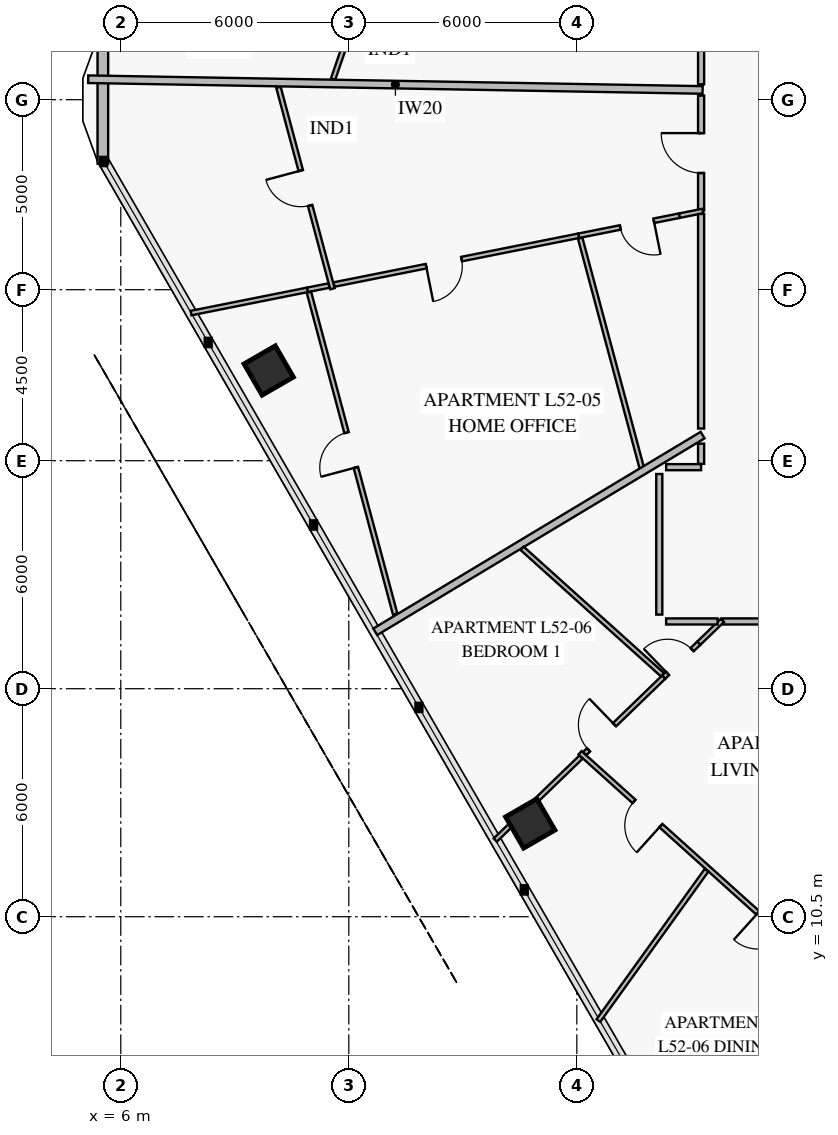
"""IFC4 building model, lengths in metres.
Left out: names, types, materials, properties, quantities, classifications, styles, units other than length and angle.
Written with IfcOpenShell. Run it as: python <this file> out.ifc"""

import sys

from ifc_helpers import new_model, si_unit, direction, frame, frame_2d, origin, origin_2d, place, context, subcontext, project, spatial, rectangle, extrude, element, fill, save


model = new_model("IFC4")
c1 = context("Model", 3, precision=1e-05, world=origin(), true_north=direction((0.0, 1.0)))
c2 = subcontext(c1, "Body", "Model", "MODEL_VIEW")
j1 = project(units=[si_unit("LENGTHUNIT", "METRE"), si_unit("PLANEANGLEUNIT", "RADIAN")], contexts=[c1])
p1 = place(None, origin())
s1 = spatial("IfcSite", under=j1, at=p1, CompositionType="ELEMENT")
p2 = place(p1, origin())
s2 = spatial("IfcBuilding", under=s1, at=p2, CompositionType="ELEMENT")
p3 = place(p2, frame((0.0, 0.0, 207.4)))
s3 = spatial("IfcBuildingStorey", under=s2, at=p3, CompositionType="ELEMENT", Elevation=207.4)
for number, where, z_axis, x_axis in (
    (1, (9.892, 24.874, 0.0), (0.0, 0.0, 1.0), (0.5, -0.866, 0.0)),
    (2, (16.774, 12.953, 0.0), (0.0, 0.0, 1.0), (0.5, -0.866, 0.0)),
):
    element("IfcColumn", number, at=place(p3, frame(where, z_axis=z_axis, x_axis=x_axis)), inside=s3, PredefinedType="COLUMN", context=c2, shape_type="SweptSolid", body=[
        extrude(rectangle(XDim=0.95, YDim=0.95, at=origin_2d()), origin(), (0.0, 0.0, 1.0), 3.55),
    ])
p4 = place(p3, frame((5.528, 30.317, 0.0), z_axis=(0.0, 0.0, 1.0), x_axis=(0.0, 1.0, 0.0)))
e3 = element("IfcWall", 3, at=p4, inside=s3, PredefinedType="SOLIDWALL", context=c2, shape_type="SweptSolid", body=[
    extrude(rectangle(XDim=3.365, YDim=0.28, at=frame_2d((1.683, 0.0))), origin(), (0.0, 0.0, 1.0), 3.55),
])
p5 = place(p3, frame((14.596, 41.283, 0.0), z_axis=(0.0, 0.0, 1.0), x_axis=(-0.325558599515, -0.945521865576, 0.0)))
e4 = element("IfcWall", 4, at=p5, inside=s3, PredefinedType="PARTITIONING", context=c2, shape_type="SweptSolid", body=[
    extrude(rectangle(XDim=9.247, YDim=0.12, at=frame_2d((4.624, 0.0))), origin(), (0.0, 0.0, 1.0), 2.9),
])
p6 = place(p5, frame((1.906, 0.0, 0.0)))
e5 = element("IfcOpeningElement", 5, at=p6, cuts=e4, PredefinedType="OPENING", context=c2, shape_type="SweptSolid", body=[
    extrude(rectangle(XDim=0.95, YDim=2.1, at=frame_2d((0.475, 1.05))), frame((0.0, 0.072, 0.0), z_axis=(0.0, -1.0, 0.0), x_axis=(1.0, 0.0, 0.0)), (0.0, 0.0, 1.0), 0.144),
])
p7 = place(p5, frame((6.289, 0.0, 0.0)))
e6 = element("IfcOpeningElement", 6, at=p7, cuts=e4, PredefinedType="OPENING", context=c2, shape_type="SweptSolid", body=[
    extrude(rectangle(XDim=0.95, YDim=2.1, at=frame_2d((0.475, 1.05))), frame((0.0, 0.072, 0.0), z_axis=(0.0, -1.0, 0.0), x_axis=(1.0, 0.0, 0.0)), (0.0, 0.0, 1.0), 0.144),
])
p8 = place(p3, frame((21.27, 38.292, 0.0), z_axis=(0.0, 0.0, 1.0), x_axis=(0.0, -1.0, 0.0)))
e7 = element("IfcWall", 7, at=p8, inside=s3, PredefinedType="PARTITIONING", context=c2, shape_type="SweptSolid", body=[
    extrude(rectangle(XDim=5.886, YDim=0.16, at=frame_2d((2.943, 0.0))), origin(), (0.0, 0.0, 1.0), 2.9),
])
p9 = place(p8, frame((2.418, 0.0, 0.0)))
e8 = element("IfcOpeningElement", 8, at=p9, cuts=e7, PredefinedType="OPENING", context=c2, shape_type="SweptSolid", body=[
    extrude(rectangle(XDim=1.05, YDim=2.15, at=frame_2d((0.525, 1.075))), frame((0.0, 0.092, 0.0), z_axis=(0.0, -1.0, 0.0), x_axis=(1.0, 0.0, 0.0)), (0.0, 0.0, 1.0), 0.184),
])
p10 = place(p3, frame((10.149, 32.326, 0.0), z_axis=(0.0, 0.0, 1.0), x_axis=(0.258800576513, -0.965930774743, 0.0)))
e9 = element("IfcWall", 9, at=p10, inside=s3, PredefinedType="PARTITIONING", context=c2, shape_type="SweptSolid", body=[
    extrude(rectangle(XDim=5.488, YDim=0.12, at=frame_2d((2.744, 0.0))), origin(), (0.0, 0.0, 1.0), 3.55),
])
p11 = place(p10, frame((2.269, 0.0, 0.0)))
e10 = element("IfcOpeningElement", 10, at=p11, cuts=e9, PredefinedType="OPENING", context=c2, shape_type="SweptSolid", body=[
    extrude(rectangle(XDim=0.95, YDim=2.1, at=frame_2d((0.475, 1.05))), frame((0.0, 0.072, 0.0), z_axis=(0.0, -1.0, 0.0), x_axis=(1.0, 0.0, 0.0)), (0.0, 0.0, 1.0), 0.144),
])
p12 = place(p3, frame((20.7, 28.948, 0.0), z_axis=(0.0, 0.0, 1.0), x_axis=(-0.980691538162, -0.19556100577, 0.0)))
e11 = element("IfcWall", 11, at=p12, inside=s3, PredefinedType="PARTITIONING", context=c2, shape_type="SweptSolid", body=[
    extrude(rectangle(XDim=2.707, YDim=0.12, at=frame_2d((1.353, 0.0))), origin(), (0.0, 0.0, 1.0), 3.55),
])
p13 = place(p12, frame((0.687, 0.0, 0.0)))
e12 = element("IfcOpeningElement", 12, at=p13, cuts=e11, PredefinedType="OPENING", context=c2, shape_type="SweptSolid", body=[
    extrude(rectangle(XDim=0.9, YDim=2.1, at=frame_2d((0.45, 1.05))), frame((0.0, 0.072, 0.0), z_axis=(0.0, -1.0, 0.0), x_axis=(1.0, 0.0, 0.0)), (0.0, 0.0, 1.0), 0.144),
])
p14 = place(p3, frame((18.046, 28.419, 0.0), z_axis=(0.0, 0.0, 1.0), x_axis=(-0.980686423889, -0.195586650874, 0.0)))
e13 = element("IfcWall", 13, at=p14, inside=s3, PredefinedType="PARTITIONING", context=c2, shape_type="SweptSolid", body=[
    extrude(rectangle(XDim=6.562, YDim=0.12, at=frame_2d((3.281, 0.0))), origin(), (0.0, 0.0, 1.0), 3.55),
])
p15 = place(p14, frame((3.139, 0.0, 0.0)))
e14 = element("IfcOpeningElement", 14, at=p15, cuts=e13, PredefinedType="OPENING", context=c2, shape_type="SweptSolid", body=[
    extrude(rectangle(XDim=0.95, YDim=2.1, at=frame_2d((0.475, 1.05))), frame((0.0, 0.072, 0.0), z_axis=(0.0, -1.0, 0.0), x_axis=(1.0, 0.0, 0.0)), (0.0, 0.0, 1.0), 0.144),
])
p16 = place(p3, frame((11.477, 27.109, 0.0), z_axis=(0.0, 0.0, 1.0), x_axis=(-0.980710082195, -0.195467988891, 0.0)))
e15 = element("IfcWall", 15, at=p16, inside=s3, PredefinedType="PARTITIONING", context=c2, shape_type="SweptSolid", body=[
    extrude(rectangle(XDim=0.58, YDim=0.12, at=frame_2d((0.29, 0.0))), origin(), (0.0, 0.0, 1.0), 3.55),
])
p17 = place(p3, frame((10.95, 26.934, 0.0), z_axis=(0.0, 0.0, 1.0), x_axis=(0.258814953738, -0.965926922558, 0.0)))
e16 = element("IfcWall", 16, at=p17, inside=s3, PredefinedType="PARTITIONING", context=c2, shape_type="SweptSolid", body=[
    extrude(rectangle(XDim=8.768, YDim=0.12, at=frame_2d((4.384, 0.0))), origin(), (0.0, 0.0, 1.0), 2.87),
])
p18 = place(p17, frame((3.825, 0.0, 0.0)))
e17 = element("IfcOpeningElement", 17, at=p18, cuts=e16, PredefinedType="OPENING", context=c2, shape_type="SweptSolid", body=[
    extrude(rectangle(XDim=0.95, YDim=2.1, at=frame_2d((0.475, 1.05))), frame((0.0, 0.072, 0.0), z_axis=(0.0, -1.0, 0.0), x_axis=(1.0, 0.0, 0.0)), (0.0, 0.0, 1.0), 0.144),
])
p19 = place(p3, frame((21.27, 32.108, 0.0), z_axis=(0.0, 0.0, 1.0), x_axis=(0.0, -1.0, 0.0)))
e18 = element("IfcWall", 18, at=p19, inside=s3, PredefinedType="PARTITIONING", context=c2, shape_type="SweptSolid", body=[
    extrude(rectangle(XDim=3.026, YDim=0.16, at=frame_2d((1.513, 0.0))), origin(), (0.0, 0.0, 1.0), 3.55),
])
p20 = place(p19, frame((0.988, 0.0, 0.0)))
e19 = element("IfcOpeningElement", 19, at=p20, cuts=e18, PredefinedType="OPENING", context=c2, shape_type="SweptSolid", body=[
    extrude(rectangle(XDim=1.05, YDim=2.15, at=frame_2d((0.525, 1.075))), frame((0.0, 0.092, 0.0), z_axis=(0.0, -1.0, 0.0), x_axis=(1.0, 0.0, 0.0)), (0.0, 0.0, 1.0), 0.184),
])
p21 = place(p3, frame((18.084, 14.814, 0.0), z_axis=(0.0, 0.0, 1.0), x_axis=(0.743144556546, -0.669130905037, 0.0)))
e20 = element("IfcWall", 20, at=p21, inside=s3, PredefinedType="PARTITIONING", context=c2, shape_type="SweptSolid", body=[
    extrude(rectangle(XDim=9.252, YDim=0.12, at=frame_2d((4.626, 0.0))), origin(), (0.0, 0.0, 1.0), 2.9),
])
p22 = place(p21, frame((1.913, 0.0, 0.0)))
e21 = element("IfcOpeningElement", 21, at=p22, cuts=e20, PredefinedType="OPENING", context=c2, shape_type="SweptSolid", body=[
    extrude(rectangle(XDim=0.95, YDim=2.1, at=frame_2d((0.475, 1.05))), frame((0.0, 0.072, 0.0), z_axis=(0.0, -1.0, 0.0), x_axis=(1.0, 0.0, 0.0)), (0.0, 0.0, 1.0), 0.144),
])
p23 = place(p21, frame((6.299, 0.0, 0.0)))
e22 = element("IfcOpeningElement", 22, at=p23, cuts=e20, PredefinedType="OPENING", context=c2, shape_type="SweptSolid", body=[
    extrude(rectangle(XDim=0.95, YDim=2.1, at=frame_2d((0.475, 1.05))), frame((0.0, 0.072, 0.0), z_axis=(0.0, -1.0, 0.0), x_axis=(1.0, 0.0, 0.0)), (0.0, 0.0, 1.0), 0.144),
])
p24 = place(p3, frame((21.213, 17.7, 0.0), z_axis=(0.0, 0.0, 1.0), x_axis=(-0.718947330121, -0.695064555643, 0.0)))
e23 = element("IfcWall", 23, at=p24, inside=s3, PredefinedType="PARTITIONING", context=c2, shape_type="SweptSolid", body=[
    extrude(rectangle(XDim=1.288, YDim=0.12, at=frame_2d((0.644, 0.0))), origin(), (0.0, 0.0, 1.0), 3.15),
])
p25 = place(p24, frame((0.248, 0.0, 0.0)))
e24 = element("IfcOpeningElement", 24, at=p25, cuts=e23, PredefinedType="OPENING", context=c2, shape_type="SweptSolid", body=[
    extrude(rectangle(XDim=0.9, YDim=2.1, at=frame_2d((0.45, 1.05))), frame((0.0, 0.072, 0.0), z_axis=(0.0, -1.0, 0.0), x_axis=(1.0, 0.0, 0.0)), (0.0, 0.0, 1.0), 0.144),
])
p26 = place(p3, frame((20.287, 16.805, 0.0), z_axis=(0.0, 0.0, 1.0), x_axis=(-0.718785844337, -0.695231551341, 0.0)))
e25 = element("IfcWall", 25, at=p26, inside=s3, PredefinedType="PARTITIONING", context=c2, shape_type="SweptSolid", body=[
    extrude(rectangle(XDim=2.892, YDim=0.12, at=frame_2d((1.446, 0.0))), origin(), (0.0, 0.0, 1.0), 3.55),
])
p27 = place(p26, frame((1.802, 0.0, 0.0)))
e26 = element("IfcOpeningElement", 26, at=p27, cuts=e25, PredefinedType="OPENING", context=c2, shape_type="SweptSolid", body=[
    extrude(rectangle(XDim=0.95, YDim=2.1, at=frame_2d((0.475, 1.05))), frame((0.0, 0.072, 0.0), z_axis=(0.0, -1.0, 0.0), x_axis=(1.0, 0.0, 0.0)), (0.0, 0.0, 1.0), 0.144),
])
p28 = place(p3, frame((18.11, 14.699, 0.0), z_axis=(0.0, 0.0, 1.0), x_axis=(-0.718877639203, -0.695136633946, 0.0)))
e27 = element("IfcWall", 27, at=p28, inside=s3, PredefinedType="PARTITIONING", context=c2, shape_type="SweptSolid", body=[
    extrude(rectangle(XDim=1.8, YDim=0.12, at=frame_2d((0.9, 0.0))), origin(), (0.0, 0.0, 1.0), 3.55),
])
p29 = place(p3, frame((21.831, 18.27, 0.0), z_axis=(0.0, 0.0, 1.0), x_axis=(1.0, 0.0, 0.0)))
e28 = element("IfcWall", 28, at=p29, inside=s3, PredefinedType="PARTITIONING", context=c2, shape_type="SweptSolid", body=[
    extrude(rectangle(XDim=7.598, YDim=0.16, at=frame_2d((3.799, 0.0))), origin(), (0.0, 0.0, 1.0), 2.9),
])
p30 = place(p29, frame((3.274, 0.0, 0.0)))
e29 = element("IfcOpeningElement", 29, at=p30, cuts=e28, PredefinedType="OPENING", context=c2, shape_type="SweptSolid", body=[
    extrude(rectangle(XDim=1.05, YDim=2.15, at=frame_2d((0.525, 1.075))), frame((0.0, 0.092, 0.0), z_axis=(0.0, -1.0, 0.0), x_axis=(1.0, 0.0, 0.0)), (0.0, 0.0, 1.0), 0.184),
])
p31 = place(p3, frame((21.31, 32.256, 0.0), z_axis=(0.0, 0.0, 1.0), x_axis=(-0.999847675861, 0.017453511821, 0.0)))
e30 = element("IfcWall", 30, at=p31, inside=s3, PredefinedType="PARTITIONING", context=c2, shape_type="SweptSolid", body=[
    extrude(rectangle(XDim=16.17, YDim=0.2, at=frame_2d((8.085, 0.0))), origin(), (0.0, 0.0, 1.0), 2.87),
])
p32 = place(p3, frame((21.314, 29.071, 0.0), z_axis=(0.0, 0.0, 1.0), x_axis=(-0.980685434384, -0.195591612261, 0.0)))
e31 = element("IfcWall", 31, at=p32, inside=s3, PredefinedType="PARTITIONING", context=c2, shape_type="SweptSolid", body=[
    extrude(rectangle(XDim=0.627, YDim=0.12, at=frame_2d((0.313, 0.0))), origin(), (0.0, 0.0, 1.0), 3.55),
])
p33 = place(p3, frame((10.908, 26.995, 0.0), z_axis=(0.0, 0.0, 1.0), x_axis=(-0.98068589365, -0.195589309516, 0.0)))
e32 = element("IfcWall", 32, at=p33, inside=s3, PredefinedType="PARTITIONING", context=c2, shape_type="SweptSolid", body=[
    extrude(rectangle(XDim=3.119, YDim=0.12, at=frame_2d((1.56, 0.0))), origin(), (0.0, 0.0, 1.0), 2.87),
])
p34 = place(p3, frame((18.088, 28.358, 0.0), z_axis=(0.0, 0.0, 1.0), x_axis=(0.258816385885, -0.96592653882, 0.0)))
e33 = element("IfcWall", 33, at=p34, inside=s3, PredefinedType="PARTITIONING", context=c2, shape_type="SweptSolid", body=[
    extrude(rectangle(XDim=6.281, YDim=0.12, at=frame_2d((3.141, 0.0))), origin(), (0.0, 0.0, 1.0), 2.9),
])
p35 = place(p3, frame((21.31, 23.173, 0.0), z_axis=(0.0, 0.0, 1.0), x_axis=(-0.857169072729, -0.515035125751, 0.0)))
e34 = element("IfcWall", 34, at=p35, inside=s3, PredefinedType="PARTITIONING", context=c2, shape_type="SweptSolid", body=[
    extrude(rectangle(XDim=10.049, YDim=0.2, at=frame_2d((5.025, 0.0))), origin(), (0.0, 0.0, 1.0), 2.87),
])
p36 = place(p3, frame((21.414, 11.724, 0.0), z_axis=(0.0, 0.0, 1.0), x_axis=(-0.583973485563, -0.81177273184, 0.0)))
e35 = element("IfcWall", 35, at=p36, inside=s3, PredefinedType="PARTITIONING", context=c2, shape_type="SweptSolid", body=[
    extrude(rectangle(XDim=4.874, YDim=0.12, at=frame_2d((2.437, 0.0))), origin(), (0.0, 0.0, 1.0), 2.87),
])
p37 = place(p3, frame((21.831, 18.298, 0.0), z_axis=(0.0, 0.0, 1.0), x_axis=(-0.718789743291, -0.695227520269, 0.0)))
e36 = element("IfcWall", 36, at=p37, inside=s3, PredefinedType="PARTITIONING", context=c2, shape_type="SweptSolid", body=[
    extrude(rectangle(XDim=0.86, YDim=0.12, at=frame_2d((0.43, 0.0))), origin(), (0.0, 0.0, 1.0), 3.55),
])
p38 = place(p3, frame((16.28, 12.929, 0.0), z_axis=(0.0, 0.0, 1.0), x_axis=(-0.718981497127, -0.695029212903, 0.0)))
e37 = element("IfcWall", 37, at=p38, inside=s3, PredefinedType="PARTITIONING", context=c2, shape_type="SweptSolid", body=[
    extrude(rectangle(XDim=0.591, YDim=0.12, at=frame_2d((0.295, 0.0))), origin(), (0.0, 0.0, 1.0), 3.55),
])
p39 = place(p3, frame((16.56, 20.194, 0.0), z_axis=(0.0, 0.0, 1.0), x_axis=(0.743147590053, -0.669127535974, 0.0)))
e38 = element("IfcWall", 38, at=p39, inside=s3, PredefinedType="PARTITIONING", context=c2, shape_type="SweptSolid", body=[
    extrude(rectangle(XDim=4.97, YDim=0.12, at=frame_2d((2.485, 0.0))), origin(), (0.0, 0.0, 1.0), 3.55),
])
p40 = place(p3, frame((21.27, 28.993, 0.0), z_axis=(0.0, 0.0, 1.0), x_axis=(0.0, -1.0, 0.0)))
e39 = element("IfcWall", 39, at=p40, inside=s3, PredefinedType="PARTITIONING", context=c2, shape_type="SweptSolid", body=[
    extrude(rectangle(XDim=5.646, YDim=0.16, at=frame_2d((2.823, 0.0))), origin(), (0.0, 0.0, 1.0), 2.9),
])
p41 = place(p3, frame((20.17, 22.15, 0.0), z_axis=(0.0, 0.0, 1.0), x_axis=(0.0, -1.0, 0.0)))
e40 = element("IfcWall", 40, at=p41, inside=s3, PredefinedType="PARTITIONING", context=c2, shape_type="SweptSolid", body=[
    extrude(rectangle(XDim=3.7, YDim=0.16, at=frame_2d((1.85, 0.0))), origin(), (0.0, 0.0, 1.0), 3.15),
])
p42 = place(p3, frame((20.35, 18.27, 0.0), z_axis=(0.0, 0.0, 1.0), x_axis=(1.0, 0.0, 0.0)))
e41 = element("IfcWall", 41, at=p42, inside=s3, PredefinedType="PARTITIONING", context=c2, shape_type="SweptSolid", body=[
    extrude(rectangle(XDim=1.354, YDim=0.16, at=frame_2d((0.677, 0.0))), origin(), (0.0, 0.0, 1.0), 3.15),
])
p43 = place(p3, frame((21.27, 22.33, 0.0), z_axis=(0.0, 0.0, 1.0), x_axis=(-1.0, 0.0, 0.0)))
e42 = element("IfcWall", 42, at=p43, inside=s3, PredefinedType="PARTITIONING", context=c2, shape_type="SweptSolid", body=[
    extrude(rectangle(XDim=0.92, YDim=0.16, at=frame_2d((0.46, 0.0))), origin(), (0.0, 0.0, 1.0), 3.55),
])
p44 = place(p3, frame((21.27, 22.95, 0.0), z_axis=(0.0, 0.0, 1.0), x_axis=(0.0, -1.0, 0.0)))
e43 = element("IfcWall", 43, at=p44, inside=s3, PredefinedType="PARTITIONING", context=c2, shape_type="SweptSolid", body=[
    extrude(rectangle(XDim=0.532, YDim=0.16, at=frame_2d((0.266, 0.0))), origin(), (0.0, 0.0, 1.0), 3.55),
])
p45 = place(p11, frame((0.95, 0.0, 0.0), z_axis=(0.0, 0.0, 1.0), x_axis=(-1.0, 0.0, 0.0)))
e44 = element("IfcDoor", 44, at=p45, inside=s3, OperationType="SINGLE_SWING_RIGHT", PredefinedType="DOOR", context=c2, shape_type="SweptSolid", body=[
    extrude(rectangle(XDim=0.95, YDim=2.1, at=frame_2d((0.475, 1.05))), frame((0.0, 0.025, 0.0), z_axis=(0.0, -1.0, 0.0), x_axis=(1.0, 0.0, 0.0)), (0.0, 0.0, 1.0), 0.05),
])
fill(e10, e44)
p46 = place(p13, origin())
e45 = element("IfcDoor", 45, at=p46, inside=s3, OperationType="SINGLE_SWING_LEFT", PredefinedType="DOOR", context=c2, shape_type="SweptSolid", body=[
    extrude(rectangle(XDim=0.9, YDim=2.1, at=frame_2d((0.45, 1.05))), frame((0.0, 0.025, 0.0), z_axis=(0.0, -1.0, 0.0), x_axis=(1.0, 0.0, 0.0)), (0.0, 0.0, 1.0), 0.05),
])
fill(e12, e45)
p47 = place(p15, origin())
e46 = element("IfcDoor", 46, at=p47, inside=s3, OperationType="SINGLE_SWING_RIGHT", PredefinedType="DOOR", context=c2, shape_type="SweptSolid", body=[
    extrude(rectangle(XDim=0.95, YDim=2.1, at=frame_2d((0.475, 1.05))), frame((0.0, 0.025, 0.0), z_axis=(0.0, -1.0, 0.0), x_axis=(1.0, 0.0, 0.0)), (0.0, 0.0, 1.0), 0.05),
])
fill(e14, e46)
p48 = place(p18, frame((0.95, 0.0, 0.0), z_axis=(0.0, 0.0, 1.0), x_axis=(-1.0, 0.0, 0.0)))
e47 = element("IfcDoor", 47, at=p48, inside=s3, OperationType="SINGLE_SWING_LEFT", PredefinedType="DOOR", context=c2, shape_type="SweptSolid", body=[
    extrude(rectangle(XDim=0.95, YDim=2.1, at=frame_2d((0.475, 1.05))), frame((0.0, 0.025, 0.0), z_axis=(0.0, -1.0, 0.0), x_axis=(1.0, 0.0, 0.0)), (0.0, 0.0, 1.0), 0.05),
])
fill(e17, e47)
p49 = place(p20, frame((1.05, 0.0, 0.0), z_axis=(0.0, 0.0, 1.0), x_axis=(-1.0, 0.0, 0.0)))
e48 = element("IfcDoor", 48, at=p49, inside=s3, OperationType="SINGLE_SWING_RIGHT", PredefinedType="DOOR", context=c2, shape_type="SweptSolid", body=[
    extrude(rectangle(XDim=1.05, YDim=2.15, at=frame_2d((0.525, 1.075))), frame((0.0, 0.025, 0.0), z_axis=(0.0, -1.0, 0.0), x_axis=(1.0, 0.0, 0.0)), (0.0, 0.0, 1.0), 0.05),
])
fill(e19, e48)
p50 = place(p22, frame((0.95, 0.0, 0.0), z_axis=(0.0, 0.0, 1.0), x_axis=(-1.0, 0.0, 0.0)))
e49 = element("IfcDoor", 49, at=p50, inside=s3, OperationType="SINGLE_SWING_LEFT", PredefinedType="DOOR", context=c2, shape_type="SweptSolid", body=[
    extrude(rectangle(XDim=0.95, YDim=2.1, at=frame_2d((0.475, 1.05))), frame((0.0, 0.025, 0.0), z_axis=(0.0, -1.0, 0.0), x_axis=(1.0, 0.0, 0.0)), (0.0, 0.0, 1.0), 0.05),
])
fill(e21, e49)
p51 = place(p23, frame((0.95, 0.0, 0.0), z_axis=(0.0, 0.0, 1.0), x_axis=(-1.0, 0.0, 0.0)))
e50 = element("IfcDoor", 50, at=p51, inside=s3, OperationType="SINGLE_SWING_RIGHT", PredefinedType="DOOR", context=c2, shape_type="SweptSolid", body=[
    extrude(rectangle(XDim=0.95, YDim=2.1, at=frame_2d((0.475, 1.05))), frame((0.0, 0.025, 0.0), z_axis=(0.0, -1.0, 0.0), x_axis=(1.0, 0.0, 0.0)), (0.0, 0.0, 1.0), 0.05),
])
fill(e22, e50)
p52 = place(p25, frame((0.9, 0.0, 0.0), z_axis=(0.0, 0.0, 1.0), x_axis=(-1.0, 0.0, 0.0)))
e51 = element("IfcDoor", 51, at=p52, inside=s3, OperationType="SINGLE_SWING_LEFT", PredefinedType="DOOR", context=c2, shape_type="SweptSolid", body=[
    extrude(rectangle(XDim=0.9, YDim=2.1, at=frame_2d((0.45, 1.05))), frame((0.0, 0.025, 0.0), z_axis=(0.0, -1.0, 0.0), x_axis=(1.0, 0.0, 0.0)), (0.0, 0.0, 1.0), 0.05),
])
fill(e24, e51)
p53 = place(p27, frame((0.95, 0.0, 0.0), z_axis=(0.0, 0.0, 1.0), x_axis=(-1.0, 0.0, 0.0)))
e52 = element("IfcDoor", 52, at=p53, inside=s3, OperationType="SINGLE_SWING_RIGHT", PredefinedType="DOOR", context=c2, shape_type="SweptSolid", body=[
    extrude(rectangle(XDim=0.95, YDim=2.1, at=frame_2d((0.475, 1.05))), frame((0.0, 0.025, 0.0), z_axis=(0.0, -1.0, 0.0), x_axis=(1.0, 0.0, 0.0)), (0.0, 0.0, 1.0), 0.05),
])
fill(e26, e52)
save(model, sys.argv[1])
